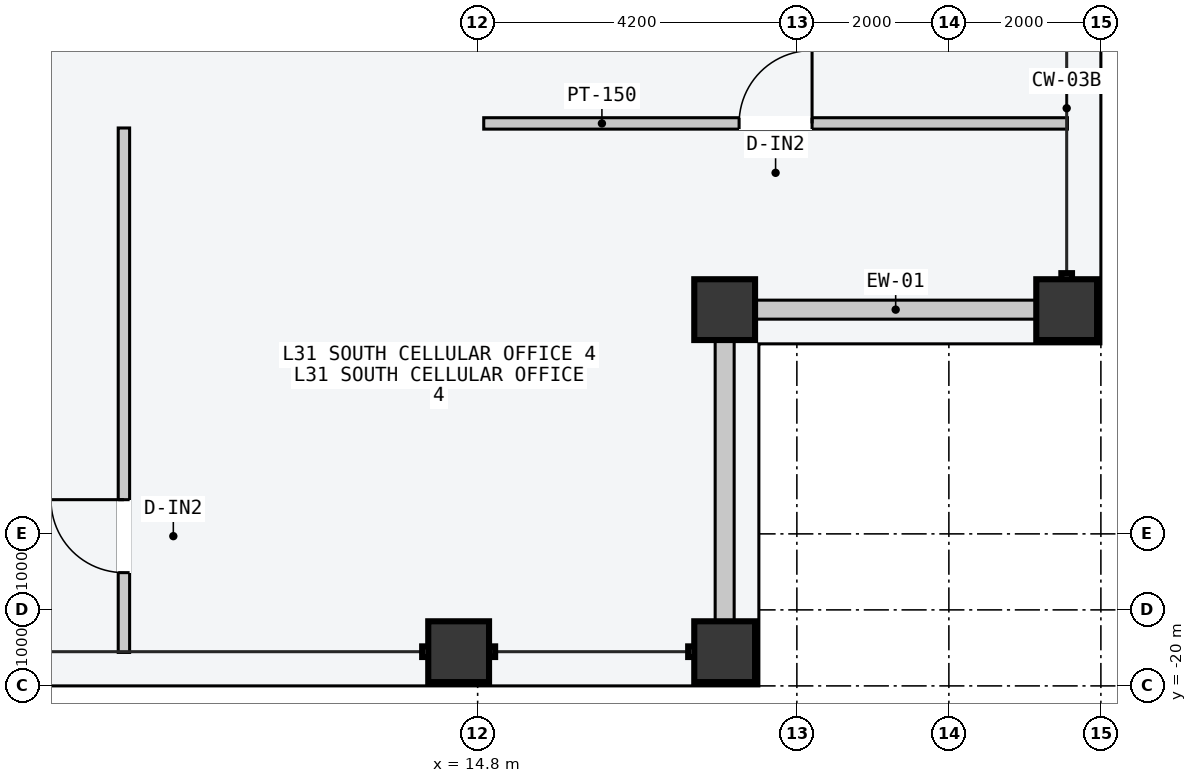
"""IFC4 building model, lengths in metres.
Left out: names, types, materials, properties, quantities, classifications, styles, units other than length and angle.
Written with IfcOpenShell. Run it as: python <this file> out.ifc"""

import sys

from ifc_helpers import new_model, si_unit, direction, frame, frame_2d, origin, origin_2d, place, context, subcontext, project, spatial, rectangle, hollow_rectangle, extrude, element, fill, save


model = new_model("IFC4")
c1 = context("Model", 3, precision=1e-05, world=origin(), true_north=direction((0.0, 1.0)))
c2 = subcontext(c1, "Body", "Model", "MODEL_VIEW")
j1 = project(units=[si_unit("LENGTHUNIT", "METRE"), si_unit("PLANEANGLEUNIT", "RADIAN")], contexts=[c1])
p1 = place(None, origin())
s1 = spatial("IfcSite", under=j1, at=p1, CompositionType="ELEMENT")
p2 = place(p1, origin())
s2 = spatial("IfcBuilding", under=s1, at=p2, CompositionType="ELEMENT")
p3 = place(p2, frame((0.0, 0.0, 120.6)))
s3 = spatial("IfcBuildingStorey", under=s2, at=p3, CompositionType="ELEMENT", Elevation=120.6)
for number, where, z_axis, x_axis in (
    (1, (14.55, -19.55, 0.0), (0.0, 0.0, 1.0), (1.0, 0.0, 0.0)),
    (2, (18.05, -19.55, 0.0), (0.0, 0.0, 1.0), (1.0, 0.0, 0.0)),
    (3, (22.55, -15.05, 0.0), (0.0, 0.0, 1.0), (0.0, 1.0, 0.0)),
    (4, (18.05, -15.05, 0.0), (0.0, 0.0, 1.0), (1.0, 0.0, 0.0)),
):
    element("IfcColumn", number, at=place(p3, frame(where, z_axis=z_axis, x_axis=x_axis)), inside=s3, PredefinedType="COLUMN", context=c2, shape_type="SweptSolid", body=[
        extrude(hollow_rectangle(XDim=0.8, YDim=0.8, WallThickness=0.036, at=origin_2d()), origin(), (0.0, 0.0, 1.0), 3.6),
    ])
for number, where, z_axis, x_axis in (
    (5, (18.46, -15.05, 0.0), (0.0, 0.0, 1.0), (1.0, 0.0, 0.0)),
    (6, (18.05, -19.14, 0.0), (0.0, 0.0, 1.0), (0.0, 1.0, 0.0)),
):
    element("IfcWall", number, at=place(p3, frame(where, z_axis=z_axis, x_axis=x_axis)), inside=s3, PredefinedType="STANDARD", context=c2, shape_type="SweptSolid", body=[
        extrude(rectangle(XDim=3.68, YDim=0.25, at=frame_2d((1.84, 0.0))), origin(), (0.0, 0.0, 1.0), 2.75),
    ])
p4 = place(p3, frame((10.146, -19.56, 0.0), z_axis=(0.0, 0.0, 1.0), x_axis=(0.0, 1.0, 0.0)))
e7 = element("IfcWall", 7, at=p4, inside=s3, PredefinedType="PARTITIONING", context=c2, shape_type="SweptSolid", body=[
    extrude(rectangle(XDim=6.9, YDim=0.15, at=frame_2d((3.45, 0.0))), origin(), (0.0, 0.0, 1.0), 3.4),
])
p5 = place(p4, frame((1.05, 0.0, 0.0)))
e8 = element("IfcOpeningElement", 8, at=p5, cuts=e7, PredefinedType="OPENING", context=c2, shape_type="SweptSolid", body=[
    extrude(rectangle(XDim=0.96, YDim=2.18, at=frame_2d((0.48, 1.09))), frame((0.0, 0.085, 0.0), z_axis=(0.0, -1.0, 0.0), x_axis=(1.0, 0.0, 0.0)), (0.0, 0.0, 1.0), 0.17),
])
p6 = place(p3, frame((14.88, -12.6, 0.0), z_axis=(0.0, 0.0, 1.0), x_axis=(1.0, 0.0, 0.0)))
e9 = element("IfcWall", 9, at=p6, inside=s3, PredefinedType="PARTITIONING", context=c2, shape_type="SweptSolid", body=[
    extrude(rectangle(XDim=7.68, YDim=0.15, at=frame_2d((3.84, 0.0))), origin(), (0.0, 0.0, 1.0), 3.4),
])
p7 = place(p6, frame((3.36, 0.0, 0.0)))
e10 = element("IfcOpeningElement", 10, at=p7, cuts=e9, PredefinedType="OPENING", context=c2, shape_type="SweptSolid", body=[
    extrude(rectangle(XDim=0.96, YDim=2.18, at=frame_2d((0.48, 1.09))), frame((0.0, 0.085, 0.0), z_axis=(0.0, -1.0, 0.0), x_axis=(1.0, 0.0, 0.0)), (0.0, 0.0, 1.0), 0.17),
])
p8 = place(p5, origin())
e11 = element("IfcDoor", 11, at=p8, inside=s3, OperationType="SINGLE_SWING_RIGHT", PredefinedType="DOOR", context=c2, shape_type="SweptSolid", body=[
    extrude(rectangle(XDim=0.96, YDim=2.18, at=frame_2d((0.48, 1.09))), frame((0.0, 0.025, 0.0), z_axis=(0.0, -1.0, 0.0), x_axis=(1.0, 0.0, 0.0)), (0.0, 0.0, 1.0), 0.05),
])
fill(e8, e11)
p9 = place(p7, origin())
e12 = element("IfcDoor", 12, at=p9, inside=s3, OperationType="SINGLE_SWING_RIGHT", PredefinedType="DOOR", context=c2, shape_type="SweptSolid", body=[
    extrude(rectangle(XDim=0.96, YDim=2.18, at=frame_2d((0.48, 1.09))), frame((0.0, 0.025, 0.0), z_axis=(0.0, -1.0, 0.0), x_axis=(1.0, 0.0, 0.0)), (0.0, 0.0, 1.0), 0.05),
])
fill(e10, e12)
save(model, sys.argv[1])
